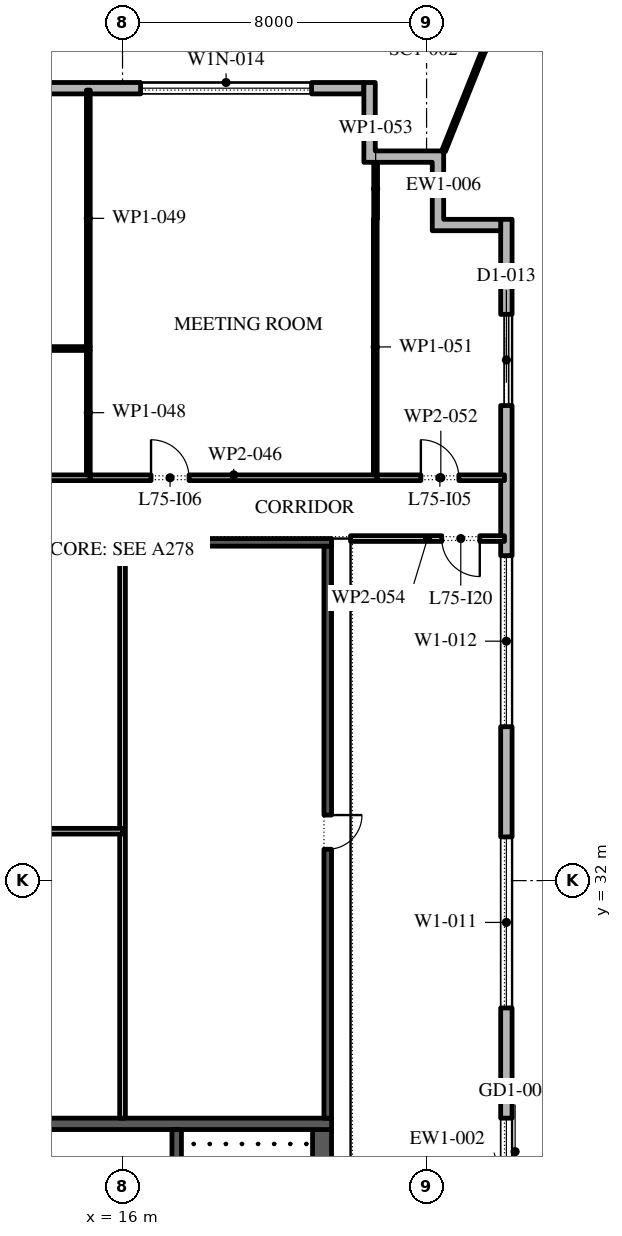
"""IFC4 building model, lengths in metres.
Left out: names, types, materials, properties, quantities, classifications, styles, units other than length and angle.
Written with IfcOpenShell. Run it as: python <this file> out.ifc"""

import sys

from ifc_helpers import new_model, si_unit, direction, frame, frame_2d, origin, place, context, subcontext, project, spatial, polyline, rectangle, outline, extrude, element, fill, save


model = new_model("IFC4")
c1 = context("Model", 3, precision=1e-05, world=origin(), true_north=direction((0.0, 1.0)))
c2 = subcontext(c1, "Body", "Model", "MODEL_VIEW")
j1 = project(units=[si_unit("LENGTHUNIT", "METRE"), si_unit("PLANEANGLEUNIT", "RADIAN")], contexts=[c1])
p1 = place(None, origin())
s1 = spatial("IfcSite", under=j1, at=p1, CompositionType="ELEMENT")
p2 = place(p1, origin())
s2 = spatial("IfcBuilding", under=s1, at=p2, CompositionType="ELEMENT")
p3 = place(p2, frame((0.0, 0.0, 342.6)))
s3 = spatial("IfcBuildingStorey", under=s2, at=p3, CompositionType="ELEMENT", Elevation=342.6)
p4 = place(p3, frame((26.1, -2.1, 0.0), z_axis=(0.0, 0.0, 1.0), x_axis=(0.0, 1.0, 0.0)))
e1 = element("IfcWall", 1, at=p4, inside=s3, PredefinedType="STANDARD", context=c2, shape_type="SweptSolid", body=[
    extrude(rectangle(XDim=51.5, YDim=0.3, at=frame_2d((25.75, 0.0))), origin(), (0.0, 0.0, 1.0), 4.0),
])
p5 = place(p4, frame((1.3, 0.0, 0.45)))
e2 = element("IfcOpeningElement", 2, at=p5, cuts=e1, PredefinedType="OPENING", context=c2, shape_type="SweptSolid", body=[
    extrude(rectangle(XDim=4.5, YDim=3.05, at=frame_2d((2.25, 1.525))), frame((0.0, 0.16, 0.0), z_axis=(0.0, -1.0, 0.0), x_axis=(1.0, 0.0, 0.0)), (0.0, 0.0, 1.0), 0.32),
])
p6 = place(p4, frame((8.55, 0.0, 0.45)))
e3 = element("IfcOpeningElement", 3, at=p6, cuts=e1, PredefinedType="OPENING", context=c2, shape_type="SweptSolid", body=[
    extrude(rectangle(XDim=4.5, YDim=3.05, at=frame_2d((2.25, 1.525))), frame((0.0, 0.16, 0.0), z_axis=(0.0, -1.0, 0.0), x_axis=(1.0, 0.0, 0.0)), (0.0, 0.0, 1.0), 0.32),
])
p7 = place(p4, frame((17.0, 0.0, 0.0)))
e4 = element("IfcOpeningElement", 4, at=p7, cuts=e1, PredefinedType="OPENING", context=c2, shape_type="SweptSolid", body=[
    extrude(rectangle(XDim=2.4, YDim=3.5, at=frame_2d((1.2, 1.75))), frame((0.0, 0.16, 0.0), z_axis=(0.0, -1.0, 0.0), x_axis=(1.0, 0.0, 0.0)), (0.0, 0.0, 1.0), 0.32),
])
p8 = place(p4, frame((23.35, 0.0, 0.45)))
e5 = element("IfcOpeningElement", 5, at=p8, cuts=e1, PredefinedType="OPENING", context=c2, shape_type="SweptSolid", body=[
    extrude(rectangle(XDim=4.5, YDim=3.05, at=frame_2d((2.25, 1.525))), frame((0.0, 0.16, 0.0), z_axis=(0.0, -1.0, 0.0), x_axis=(1.0, 0.0, 0.0)), (0.0, 0.0, 1.0), 0.32),
])
p9 = place(p4, frame((30.75, 0.0, 0.45)))
e6 = element("IfcOpeningElement", 6, at=p9, cuts=e1, PredefinedType="OPENING", context=c2, shape_type="SweptSolid", body=[
    extrude(rectangle(XDim=4.5, YDim=3.05, at=frame_2d((2.25, 1.525))), frame((0.0, 0.16, 0.0), z_axis=(0.0, -1.0, 0.0), x_axis=(1.0, 0.0, 0.0)), (0.0, 0.0, 1.0), 0.32),
])
p10 = place(p4, frame((38.15, 0.0, 0.45)))
e7 = element("IfcOpeningElement", 7, at=p10, cuts=e1, PredefinedType="OPENING", context=c2, shape_type="SweptSolid", body=[
    extrude(rectangle(XDim=4.5, YDim=3.05, at=frame_2d((2.25, 1.525))), frame((0.0, 0.16, 0.0), z_axis=(0.0, -1.0, 0.0), x_axis=(1.0, 0.0, 0.0)), (0.0, 0.0, 1.0), 0.32),
])
p11 = place(p4, frame((46.6, 0.0, 0.0)))
e8 = element("IfcOpeningElement", 8, at=p11, cuts=e1, PredefinedType="OPENING", context=c2, shape_type="SweptSolid", body=[
    extrude(rectangle(XDim=2.4, YDim=3.5, at=frame_2d((1.2, 1.75))), frame((0.0, 0.16, 0.0), z_axis=(0.0, -1.0, 0.0), x_axis=(1.0, 0.0, 0.0)), (0.0, 0.0, 1.0), 0.32),
])
p12 = place(p3, frame((22.35, 52.85, 0.0), z_axis=(0.0, 0.0, 1.0), x_axis=(-1.0, 0.0, 0.0)))
e9 = element("IfcWall", 9, at=p12, inside=s3, PredefinedType="STANDARD", context=c2, shape_type="SweptSolid", body=[
    extrude(rectangle(XDim=45.0, YDim=0.3, at=frame_2d((22.5, 0.0))), origin(), (0.0, 0.0, 1.0), 4.0),
])
p13 = place(p12, frame((1.375, 0.0, 0.45)))
e10 = element("IfcOpeningElement", 10, at=p13, cuts=e9, PredefinedType="OPENING", context=c2, shape_type="SweptSolid", body=[
    extrude(rectangle(XDim=4.5, YDim=2.525, at=frame_2d((2.25, 1.262))), frame((0.0, 0.16, 0.0), z_axis=(0.0, -1.0, 0.0), x_axis=(1.0, 0.0, 0.0)), (0.0, 0.0, 1.0), 0.32),
])
p14 = place(p12, frame((8.775, 0.0, 0.45)))
e11 = element("IfcOpeningElement", 11, at=p14, cuts=e9, PredefinedType="OPENING", context=c2, shape_type="SweptSolid", body=[
    extrude(rectangle(XDim=4.5, YDim=2.525, at=frame_2d((2.25, 1.262))), frame((0.0, 0.16, 0.0), z_axis=(0.0, -1.0, 0.0), x_axis=(1.0, 0.0, 0.0)), (0.0, 0.0, 1.0), 0.32),
])
p15 = place(p12, frame((17.375, 0.0, 0.0)))
e12 = element("IfcOpeningElement", 12, at=p15, cuts=e9, PredefinedType="OPENING", context=c2, shape_type="SweptSolid", body=[
    extrude(rectangle(XDim=2.4, YDim=2.975, at=frame_2d((1.2, 1.488))), frame((0.0, 0.16, 0.0), z_axis=(0.0, -1.0, 0.0), x_axis=(1.0, 0.0, 0.0)), (0.0, 0.0, 1.0), 0.32),
])
p16 = place(p12, frame((23.875, 0.0, 0.45)))
e13 = element("IfcOpeningElement", 13, at=p16, cuts=e9, PredefinedType="OPENING", context=c2, shape_type="SweptSolid", body=[
    extrude(rectangle(XDim=4.5, YDim=2.525, at=frame_2d((2.25, 1.262))), frame((0.0, 0.16, 0.0), z_axis=(0.0, -1.0, 0.0), x_axis=(1.0, 0.0, 0.0)), (0.0, 0.0, 1.0), 0.32),
])
p17 = place(p12, frame((31.425, 0.0, 0.45)))
e14 = element("IfcOpeningElement", 14, at=p17, cuts=e9, PredefinedType="OPENING", context=c2, shape_type="SweptSolid", body=[
    extrude(rectangle(XDim=4.5, YDim=2.525, at=frame_2d((2.25, 1.262))), frame((0.0, 0.16, 0.0), z_axis=(0.0, -1.0, 0.0), x_axis=(1.0, 0.0, 0.0)), (0.0, 0.0, 1.0), 0.32),
])
p18 = place(p12, frame((38.975, 0.0, 0.45)))
e15 = element("IfcOpeningElement", 15, at=p18, cuts=e9, PredefinedType="OPENING", context=c2, shape_type="SweptSolid", body=[
    extrude(rectangle(XDim=4.5, YDim=2.525, at=frame_2d((2.25, 1.262))), frame((0.0, 0.16, 0.0), z_axis=(0.0, -1.0, 0.0), x_axis=(1.0, 0.0, 0.0)), (0.0, 0.0, 1.0), 0.32),
])
p19 = place(p3, origin())
e16 = element("IfcWall", 16, at=p19, inside=s3, PredefinedType="STANDARD", context=c2, shape_type="SweptSolid", body=[
    extrude(outline(polyline([(24.15, 50.9), (22.35, 50.9), (22.35, 53.0), (22.65, 53.0), (22.65, 51.2), (24.45, 51.2), (24.45, 49.4), (25.95, 49.4), (25.95, 49.1), (24.15, 49.1), (24.15, 50.9)])), origin(), (0.0, 0.0, 1.0), 4.0),
])
p20 = place(p3, frame((24.45, 51.2, -0.05), z_axis=(0.0, 0.0, 1.0), x_axis=(0.371412694589, 0.928467883288, 0.0)))
e17 = element("IfcWall", 17, at=p20, inside=s3, PredefinedType="STANDARD", context=c2, shape_type="SweptSolid", body=[
    extrude(rectangle(XDim=5.735, YDim=0.1, at=frame_2d((2.868, 0.0))), origin(), (0.0, 0.0, 1.0), 4.05),
])
p21 = place(p3, frame((21.25, -2.45, 0.0), z_axis=(0.0, 0.0, 1.0), x_axis=(0.0, 1.0, 0.0)))
e18 = element("IfcWall", 18, at=p21, inside=s3, PredefinedType="SHEAR", context=c2, shape_type="SweptSolid", body=[
    extrude(rectangle(XDim=27.9, YDim=0.5, at=frame_2d((13.95, 0.0))), origin(), (0.0, 0.0, 1.0), 4.0),
])
p22 = place(p21, frame((5.05, 0.0, 0.0)))
e19 = element("IfcOpeningElement", 19, at=p22, cuts=e18, PredefinedType="OPENING", context=c2, shape_type="SweptSolid", body=[
    extrude(rectangle(XDim=1.2, YDim=2.1, at=frame_2d((0.6, 1.05))), frame((0.0, 0.26, 0.0), z_axis=(0.0, -1.0, 0.0), x_axis=(1.0, 0.0, 0.0)), (0.0, 0.0, 1.0), 0.52),
])
p23 = place(p21, frame((21.65, 0.0, 0.0)))
e20 = element("IfcOpeningElement", 20, at=p23, cuts=e18, PredefinedType="OPENING", context=c2, shape_type="SweptSolid", body=[
    extrude(rectangle(XDim=1.2, YDim=2.1, at=frame_2d((0.6, 1.05))), frame((0.0, 0.26, 0.0), z_axis=(0.0, -1.0, 0.0), x_axis=(1.0, 0.0, 0.0)), (0.0, 0.0, 1.0), 0.52),
])
p24 = place(p3, frame((10.5, 25.6, 0.0), z_axis=(0.0, 0.0, 1.0), x_axis=(1.0, 0.0, 0.0)))
e21 = element("IfcWall", 21, at=p24, inside=s3, PredefinedType="SHEAR", context=c2, shape_type="SweptSolid", body=[
    extrude(rectangle(XDim=11.0, YDim=0.3, at=frame_2d((5.5, 0.0))), origin(), (0.0, 0.0, 1.0), 4.0),
])
p25 = place(p3, frame((17.425, 19.15, 0.0), z_axis=(0.0, 0.0, 1.0), x_axis=(0.0, 1.0, 0.0)))
e22 = element("IfcWall", 22, at=p25, inside=s3, PredefinedType="SHEAR", context=c2, shape_type="SweptSolid", body=[
    extrude(rectangle(XDim=6.3, YDim=0.25, at=frame_2d((3.15, 0.0))), origin(), (0.0, 0.0, 1.0), 4.0),
])
p26 = place(p25, frame((0.05, 0.0, 0.0)))
e23 = element("IfcOpeningElement", 23, at=p26, cuts=e22, PredefinedType="OPENING", context=c2, shape_type="SweptSolid", body=[
    extrude(rectangle(XDim=1.2, YDim=2.1, at=frame_2d((0.6, 1.05))), frame((0.0, 0.135, 0.0), z_axis=(0.0, -1.0, 0.0), x_axis=(1.0, 0.0, 0.0)), (0.0, 0.0, 1.0), 0.27),
])
p27 = place(p3, frame((21.4, 25.75, 0.0), z_axis=(0.0, 0.0, 1.0), x_axis=(0.0, 1.0, 0.0)))
e24 = element("IfcWall", 24, at=p27, inside=s3, PredefinedType="SHEAR", context=c2, shape_type="SweptSolid", body=[
    extrude(rectangle(XDim=15.05, YDim=0.2, at=frame_2d((7.525, 0.0))), origin(), (0.0, 0.0, 1.0), 4.0),
])
p28 = place(p27, frame((7.075, 0.0, 0.0)))
e25 = element("IfcOpeningElement", 25, at=p28, cuts=e24, PredefinedType="OPENING", context=c2, shape_type="SweptSolid", body=[
    extrude(rectangle(XDim=0.9, YDim=2.1, at=frame_2d((0.45, 1.05))), frame((0.0, 0.11, 0.0), z_axis=(0.0, -1.0, 0.0), x_axis=(1.0, 0.0, 0.0)), (0.0, 0.0, 1.0), 0.22),
])
p29 = place(p3, frame((10.5, 40.9, 0.0), z_axis=(0.0, 0.0, 1.0), x_axis=(1.0, 0.0, 0.0)))
e26 = element("IfcWall", 26, at=p29, inside=s3, PredefinedType="SHEAR", context=c2, shape_type="SweptSolid", body=[
    extrude(rectangle(XDim=11.0, YDim=0.2, at=frame_2d((5.5, 0.0))), origin(), (0.0, 0.0, 1.0), 4.0),
])
p30 = place(p3, frame((16.0, 25.75, 0.0), z_axis=(0.0, 0.0, 1.0), x_axis=(0.0, 1.0, 0.0)))
e27 = element("IfcWall", 27, at=p30, inside=s3, PredefinedType="PARTITIONING", context=c2, shape_type="SweptSolid", body=[
    extrude(rectangle(XDim=15.05, YDim=0.15, at=frame_2d((7.525, 0.0))), origin(), (0.0, 0.0, 1.0), 4.0),
])
p31 = place(p3, frame((10.7, 33.3, 0.0), z_axis=(0.0, 0.0, 1.0), x_axis=(1.0, 0.0, 0.0)))
e28 = element("IfcWall", 28, at=p31, inside=s3, PredefinedType="PARTITIONING", context=c2, shape_type="SweptSolid", body=[
    extrude(rectangle(XDim=5.3, YDim=0.15, at=frame_2d((2.65, 0.0))), origin(), (0.0, 0.0, 1.0), 4.0),
])
p32 = place(p3, frame((7.5, 42.6, 0.0), z_axis=(0.0, 0.0, 1.0), x_axis=(1.0, 0.0, 0.0)))
e29 = element("IfcWall", 29, at=p32, inside=s3, PredefinedType="PARTITIONING", context=c2, shape_type="SweptSolid", body=[
    extrude(rectangle(XDim=7.65, YDim=0.15, at=frame_2d((3.825, 0.0))), origin(), (0.0, 0.0, 1.0), 4.0),
])
p33 = place(p32, frame((4.2, 0.0, 0.0)))
e30 = element("IfcOpeningElement", 30, at=p33, cuts=e29, PredefinedType="OPENING", context=c2, shape_type="SweptSolid", body=[
    extrude(rectangle(XDim=1.0, YDim=2.1, at=frame_2d((0.5, 1.05))), frame((0.0, 0.085, 0.0), z_axis=(0.0, -1.0, 0.0), x_axis=(1.0, 0.0, 0.0)), (0.0, 0.0, 1.0), 0.17),
])
p34 = place(p3, frame((15.15, 42.6, 0.0), z_axis=(0.0, 0.0, 1.0), x_axis=(1.0, 0.0, 0.0)))
e31 = element("IfcWall", 31, at=p34, inside=s3, PredefinedType="PARTITIONING", context=c2, shape_type="SweptSolid", body=[
    extrude(rectangle(XDim=7.55, YDim=0.15, at=frame_2d((3.775, 0.0))), origin(), (0.0, 0.0, 1.0), 4.0),
])
p35 = place(p34, frame((1.6, 0.0, 0.0)))
e32 = element("IfcOpeningElement", 32, at=p35, cuts=e31, PredefinedType="OPENING", context=c2, shape_type="SweptSolid", body=[
    extrude(rectangle(XDim=1.0, YDim=2.1, at=frame_2d((0.5, 1.05))), frame((0.0, 0.085, 0.0), z_axis=(0.0, -1.0, 0.0), x_axis=(1.0, 0.0, 0.0)), (0.0, 0.0, 1.0), 0.17),
])
p36 = place(p3, frame((15.15, 46.0, 0.0), z_axis=(0.0, 0.0, 1.0), x_axis=(-1.0, 0.0, 0.0)))
e33 = element("IfcWall", 33, at=p36, inside=s3, PredefinedType="PARTITIONING", context=c2, shape_type="SweptSolid", body=[
    extrude(rectangle(XDim=7.55, YDim=0.1, at=frame_2d((3.775, 0.0))), origin(), (0.0, 0.0, 1.0), 4.0),
])
p37 = place(p36, frame((1.75, 0.0, 0.0)))
e34 = element("IfcOpeningElement", 34, at=p37, cuts=e33, PredefinedType="OPENING", context=c2, shape_type="SweptSolid", body=[
    extrude(rectangle(XDim=0.9, YDim=2.1, at=frame_2d((0.45, 1.05))), frame((0.0, 0.06, 0.0), z_axis=(0.0, -1.0, 0.0), x_axis=(1.0, 0.0, 0.0)), (0.0, 0.0, 1.0), 0.12),
])
p38 = place(p3, frame((15.1, 45.95, 0.0), z_axis=(0.0, 0.0, 1.0), x_axis=(0.0, -1.0, 0.0)))
e35 = element("IfcWall", 35, at=p38, inside=s3, PredefinedType="PARTITIONING", context=c2, shape_type="SweptSolid", body=[
    extrude(rectangle(XDim=3.275, YDim=0.1, at=frame_2d((1.637, 0.0))), origin(), (0.0, 0.0, 1.0), 4.0),
])
p39 = place(p3, frame((15.1, 52.8, 0.0), z_axis=(0.0, 0.0, 1.0), x_axis=(0.0, -1.0, 0.0)))
e36 = element("IfcWall", 36, at=p39, inside=s3, PredefinedType="PARTITIONING", context=c2, shape_type="SweptSolid", body=[
    extrude(rectangle(XDim=6.75, YDim=0.1, at=frame_2d((3.375, 0.0))), origin(), (0.0, 0.0, 1.0), 4.0),
])
p40 = place(p3, frame((22.65, 42.675, 0.0), z_axis=(0.0, 0.0, 1.0), x_axis=(0.0, 1.0, 0.0)))
e37 = element("IfcWall", 37, at=p40, inside=s3, PredefinedType="PARTITIONING", context=c2, shape_type="SweptSolid", body=[
    extrude(rectangle(XDim=6.735, YDim=0.1, at=frame_2d((3.367, 0.0))), origin(), (0.0, 0.0, 1.0), 4.0),
])
p41 = place(p3, frame((22.7, 42.6, 0.0), z_axis=(0.0, 0.0, 1.0), x_axis=(1.0, 0.0, 0.0)))
e38 = element("IfcWall", 38, at=p41, inside=s3, PredefinedType="PARTITIONING", context=c2, shape_type="SweptSolid", body=[
    extrude(rectangle(XDim=3.35, YDim=0.15, at=frame_2d((1.675, 0.0))), origin(), (0.0, 0.0, 1.0), 4.0),
])
p42 = place(p41, frame((1.15, 0.0, 0.0)))
e39 = element("IfcOpeningElement", 39, at=p42, cuts=e38, PredefinedType="OPENING", context=c2, shape_type="SweptSolid", body=[
    extrude(rectangle(XDim=1.0, YDim=2.1, at=frame_2d((0.5, 1.05))), frame((0.0, 0.085, 0.0), z_axis=(0.0, -1.0, 0.0), x_axis=(1.0, 0.0, 0.0)), (0.0, 0.0, 1.0), 0.17),
])
p43 = place(p3, frame((22.66, 49.41, 0.0), z_axis=(0.0, 0.0, 1.0), x_axis=(0.0, 1.0, 0.0)))
e40 = element("IfcWall", 40, at=p43, inside=s3, PredefinedType="PARTITIONING", context=c2, shape_type="SweptSolid", body=[
    extrude(rectangle(XDim=1.59, YDim=0.1, at=frame_2d((0.795, 0.0))), origin(), (0.0, 0.0, 1.0), 4.0),
])
p44 = place(p3, frame((26.05, 41.0, 0.0), z_axis=(0.0, 0.0, 1.0), x_axis=(-1.0, 0.0, 0.0)))
e41 = element("IfcWall", 41, at=p44, inside=s3, PredefinedType="PARTITIONING", context=c2, shape_type="SweptSolid", body=[
    extrude(rectangle(XDim=4.05, YDim=0.15, at=frame_2d((2.025, 0.0))), origin(), (0.0, 0.0, 1.0), 4.0),
])
p45 = place(p44, frame((0.65, 0.0, 0.0)))
e42 = element("IfcOpeningElement", 42, at=p45, cuts=e41, PredefinedType="OPENING", context=c2, shape_type="SweptSolid", body=[
    extrude(rectangle(XDim=1.0, YDim=2.1, at=frame_2d((0.5, 1.05))), frame((0.0, 0.085, 0.0), z_axis=(0.0, -1.0, 0.0), x_axis=(1.0, 0.0, 0.0)), (0.0, 0.0, 1.0), 0.17),
])
p46 = place(p8, origin())
e43 = element("IfcWindow", 43, at=p46, inside=s3, PartitioningType="DOUBLE_PANEL_VERTICAL", PredefinedType="WINDOW", context=c2, shape_type="SweptSolid", body=[
    extrude(rectangle(XDim=4.5, YDim=3.05, at=frame_2d((2.25, 1.525))), frame((0.0, 0.03, 0.0), z_axis=(0.0, -1.0, 0.0), x_axis=(1.0, 0.0, 0.0)), (0.0, 0.0, 1.0), 0.06),
])
fill(e5, e43)
p47 = place(p9, origin())
e44 = element("IfcWindow", 44, at=p47, inside=s3, PartitioningType="DOUBLE_PANEL_VERTICAL", PredefinedType="WINDOW", context=c2, shape_type="SweptSolid", body=[
    extrude(rectangle(XDim=4.5, YDim=3.05, at=frame_2d((2.25, 1.525))), frame((0.0, 0.03, 0.0), z_axis=(0.0, -1.0, 0.0), x_axis=(1.0, 0.0, 0.0)), (0.0, 0.0, 1.0), 0.06),
])
fill(e6, e44)
p48 = place(p10, origin())
e45 = element("IfcWindow", 45, at=p48, inside=s3, PartitioningType="DOUBLE_PANEL_VERTICAL", PredefinedType="WINDOW", context=c2, shape_type="SweptSolid", body=[
    extrude(rectangle(XDim=4.5, YDim=3.05, at=frame_2d((2.25, 1.525))), frame((0.0, 0.03, 0.0), z_axis=(0.0, -1.0, 0.0), x_axis=(1.0, 0.0, 0.0)), (0.0, 0.0, 1.0), 0.06),
])
fill(e7, e45)
p49 = place(p11, origin())
e46 = element("IfcDoor", 46, at=p49, inside=s3, OperationType="DOUBLE_DOOR_SLIDING", PredefinedType="DOOR", context=c2, shape_type="SweptSolid", body=[
    extrude(rectangle(XDim=2.4, YDim=3.5, at=frame_2d((1.2, 1.75))), frame((0.0, 0.025, 0.0), z_axis=(0.0, -1.0, 0.0), x_axis=(1.0, 0.0, 0.0)), (0.0, 0.0, 1.0), 0.05),
])
fill(e8, e46)
p50 = place(p13, origin())
e47 = element("IfcWindow", 47, at=p50, inside=s3, PartitioningType="DOUBLE_PANEL_VERTICAL", PredefinedType="WINDOW", context=c2, shape_type="SweptSolid", body=[
    extrude(rectangle(XDim=4.5, YDim=2.525, at=frame_2d((2.25, 1.262))), frame((0.0, 0.03, 0.0), z_axis=(0.0, -1.0, 0.0), x_axis=(1.0, 0.0, 0.0)), (0.0, 0.0, 1.0), 0.06),
])
fill(e10, e47)
p51 = place(p28, frame((0.9, 0.15, 0.0), z_axis=(0.0, 0.0, 1.0), x_axis=(-1.0, 0.0, 0.0)))
e48 = element("IfcDoor", 48, at=p51, inside=s3, OperationType="SINGLE_SWING_RIGHT", PredefinedType="DOOR", context=c2, shape_type="SweptSolid", body=[
    extrude(rectangle(XDim=0.9, YDim=2.1, at=frame_2d((0.45, 1.05))), frame((0.0, 0.1, 0.0), z_axis=(0.0, -1.0, 0.0), x_axis=(1.0, 0.0, 0.0)), (0.0, 0.0, 1.0), 0.05),
])
fill(e25, e48)
p52 = place(p42, origin())
e49 = element("IfcDoor", 49, at=p52, inside=s3, OperationType="SINGLE_SWING_RIGHT", PredefinedType="DOOR", context=c2, shape_type="SweptSolid", body=[
    extrude(rectangle(XDim=1.0, YDim=2.1, at=frame_2d((0.5, 1.05))), frame((0.0, 0.025, 0.0), z_axis=(0.0, -1.0, 0.0), x_axis=(1.0, 0.0, 0.0)), (0.0, 0.0, 1.0), 0.05),
])
fill(e39, e49)
p53 = place(p35, origin())
e50 = element("IfcDoor", 50, at=p53, inside=s3, OperationType="SINGLE_SWING_RIGHT", PredefinedType="DOOR", context=c2, shape_type="SweptSolid", body=[
    extrude(rectangle(XDim=1.0, YDim=2.1, at=frame_2d((0.5, 1.05))), frame((0.0, 0.025, 0.0), z_axis=(0.0, -1.0, 0.0), x_axis=(1.0, 0.0, 0.0)), (0.0, 0.0, 1.0), 0.05),
])
fill(e32, e50)
p54 = place(p45, origin())
e51 = element("IfcDoor", 51, at=p54, inside=s3, OperationType="SINGLE_SWING_RIGHT", PredefinedType="DOOR", context=c2, shape_type="SweptSolid", body=[
    extrude(rectangle(XDim=1.0, YDim=2.1, at=frame_2d((0.5, 1.05))), frame((0.0, 0.025, 0.0), z_axis=(0.0, -1.0, 0.0), x_axis=(1.0, 0.0, 0.0)), (0.0, 0.0, 1.0), 0.05),
])
fill(e42, e51)
save(model, sys.argv[1])
